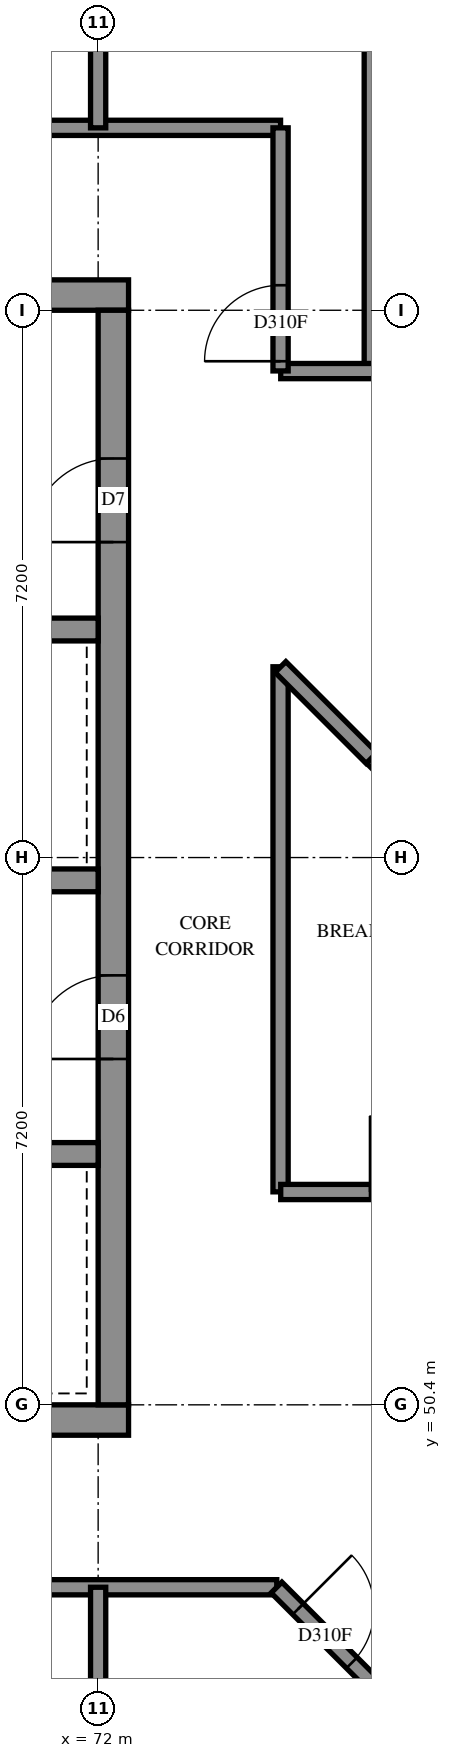
"""IFC4 building model, lengths in metres.
Left out: names, types, materials, properties, quantities, classifications, styles, units other than length and angle.
Written with IfcOpenShell. Run it as: python <this file> out.ifc"""

import sys

from ifc_helpers import new_model, si_unit, direction, frame, frame_2d, origin, place, context, subcontext, project, spatial, rectangle, extrude, element, fill, save


model = new_model("IFC4")
c1 = context("Model", 3, precision=1e-05, world=origin(), true_north=direction((0.0, 1.0)))
c2 = subcontext(c1, "Body", "Model", "MODEL_VIEW")
j1 = project(units=[si_unit("LENGTHUNIT", "METRE"), si_unit("PLANEANGLEUNIT", "RADIAN")], contexts=[c1])
p1 = place(None, origin())
s1 = spatial("IfcSite", under=j1, at=p1, CompositionType="ELEMENT")
p2 = place(p1, origin())
s2 = spatial("IfcBuilding", under=s1, at=p2, CompositionType="ELEMENT")
p3 = place(p2, frame((0.0, 0.0, 281.2)))
s3 = spatial("IfcBuildingStorey", under=s2, at=p3, CompositionType="ELEMENT", Elevation=281.2)
p4 = place(p3, frame((57.2, 50.2, -0.3), z_axis=(0.0, 0.0, 1.0), x_axis=(1.0, 0.0, 0.0)))
e1 = element("IfcWall", 1, at=p4, inside=s3, PredefinedType="SHEAR", context=c2, shape_type="SweptSolid", body=[
    extrude(rectangle(XDim=15.2, YDim=0.4, at=frame_2d((7.6, 0.0))), origin(), (0.0, 0.0, 1.0), 2.7),
])
p5 = place(p3, frame((57.2, 65.0, -0.3), z_axis=(0.0, 0.0, 1.0), x_axis=(1.0, 0.0, 0.0)))
e2 = element("IfcWall", 2, at=p5, inside=s3, PredefinedType="SHEAR", context=c2, shape_type="SweptSolid", body=[
    extrude(rectangle(XDim=15.2, YDim=0.4, at=frame_2d((7.6, 0.0))), origin(), (0.0, 0.0, 1.0), 2.7),
])
p6 = place(p5, frame((10.4, 0.0, 0.3)))
e3 = element("IfcOpeningElement", 3, at=p6, cuts=e2, PredefinedType="OPENING", context=c2, shape_type="SweptSolid", body=[
    extrude(rectangle(XDim=0.8, YDim=2.1, at=frame_2d((0.4, 1.05))), frame((0.0, 0.21, 0.0), z_axis=(0.0, -1.0, 0.0), x_axis=(1.0, 0.0, 0.0)), (0.0, 0.0, 1.0), 0.42),
])
p7 = place(p3, frame((72.2, 50.4, -0.3), z_axis=(0.0, 0.0, 1.0), x_axis=(0.0, 1.0, 0.0)))
e4 = element("IfcWall", 4, at=p7, inside=s3, PredefinedType="SHEAR", context=c2, shape_type="SweptSolid", body=[
    extrude(rectangle(XDim=14.4, YDim=0.4, at=frame_2d((7.2, 0.0))), origin(), (0.0, 0.0, 1.0), 2.7),
])
p8 = place(p7, frame((4.55, 0.0, 0.3)))
e5 = element("IfcOpeningElement", 5, at=p8, cuts=e4, PredefinedType="OPENING", context=c2, shape_type="SweptSolid", body=[
    extrude(rectangle(XDim=1.1, YDim=2.1, at=frame_2d((0.55, 1.05))), frame((0.0, 0.21, 0.0), z_axis=(0.0, -1.0, 0.0), x_axis=(1.0, 0.0, 0.0)), (0.0, 0.0, 1.0), 0.42),
])
p9 = place(p7, frame((11.35, 0.0, 0.3)))
e6 = element("IfcOpeningElement", 6, at=p9, cuts=e4, PredefinedType="OPENING", context=c2, shape_type="SweptSolid", body=[
    extrude(rectangle(XDim=1.1, YDim=2.1, at=frame_2d((0.55, 1.05))), frame((0.0, 0.21, 0.0), z_axis=(0.0, -1.0, 0.0), x_axis=(1.0, 0.0, 0.0)), (0.0, 0.0, 1.0), 0.42),
])
p10 = place(p3, frame((57.6, 53.7, 0.0), z_axis=(0.0, 0.0, 1.0), x_axis=(1.0, 0.0, 0.0)))
e7 = element("IfcWall", 7, at=p10, inside=s3, PredefinedType="SOLIDWALL", context=c2, shape_type="SweptSolid", body=[
    extrude(rectangle(XDim=14.4, YDim=0.3, at=frame_2d((7.2, 0.0))), origin(), (0.0, 0.0, 1.0), 3.1),
])
p11 = place(p10, frame((1.35, 0.0, 0.0)))
e8 = element("IfcOpeningElement", 8, at=p11, cuts=e7, PredefinedType="OPENING", context=c2, shape_type="SweptSolid", body=[
    extrude(rectangle(XDim=0.9, YDim=2.1, at=frame_2d((0.45, 1.05))), frame((0.0, 0.16, 0.0), z_axis=(0.0, -1.0, 0.0), x_axis=(1.0, 0.0, 0.0)), (0.0, 0.0, 1.0), 0.32),
])
p12 = place(p10, frame((4.95, 0.0, 0.0)))
e9 = element("IfcOpeningElement", 9, at=p12, cuts=e7, PredefinedType="OPENING", context=c2, shape_type="SweptSolid", body=[
    extrude(rectangle(XDim=0.9, YDim=2.1, at=frame_2d((0.45, 1.05))), frame((0.0, 0.16, 0.0), z_axis=(0.0, -1.0, 0.0), x_axis=(1.0, 0.0, 0.0)), (0.0, 0.0, 1.0), 0.32),
])
p13 = place(p10, frame((8.55, 0.0, 0.0)))
e10 = element("IfcOpeningElement", 10, at=p13, cuts=e7, PredefinedType="OPENING", context=c2, shape_type="SweptSolid", body=[
    extrude(rectangle(XDim=0.9, YDim=2.1, at=frame_2d((0.45, 1.05))), frame((0.0, 0.16, 0.0), z_axis=(0.0, -1.0, 0.0), x_axis=(1.0, 0.0, 0.0)), (0.0, 0.0, 1.0), 0.32),
])
p14 = place(p10, frame((12.05, 0.0, 0.0)))
e11 = element("IfcOpeningElement", 11, at=p14, cuts=e7, PredefinedType="OPENING", context=c2, shape_type="SweptSolid", body=[
    extrude(rectangle(XDim=1.1, YDim=2.1, at=frame_2d((0.55, 1.05))), frame((0.0, 0.16, 0.0), z_axis=(0.0, -1.0, 0.0), x_axis=(1.0, 0.0, 0.0)), (0.0, 0.0, 1.0), 0.32),
])
p15 = place(p3, frame((57.6, 57.3, 0.0), z_axis=(0.0, 0.0, 1.0), x_axis=(1.0, 0.0, 0.0)))
e12 = element("IfcWall", 12, at=p15, inside=s3, PredefinedType="SOLIDWALL", context=c2, shape_type="SweptSolid", body=[
    extrude(rectangle(XDim=14.4, YDim=0.3, at=frame_2d((7.2, 0.0))), origin(), (0.0, 0.0, 1.0), 3.1),
])
p16 = place(p15, frame((8.55, 0.0, 0.0)))
e13 = element("IfcOpeningElement", 13, at=p16, cuts=e12, PredefinedType="OPENING", context=c2, shape_type="SweptSolid", body=[
    extrude(rectangle(XDim=0.9, YDim=2.1, at=frame_2d((0.45, 1.05))), frame((0.0, 0.16, 0.0), z_axis=(0.0, -1.0, 0.0), x_axis=(1.0, 0.0, 0.0)), (0.0, 0.0, 1.0), 0.32),
])
p17 = place(p15, frame((1.25, 0.0, 0.0)))
e14 = element("IfcOpeningElement", 14, at=p17, cuts=e12, PredefinedType="OPENING", context=c2, shape_type="SweptSolid", body=[
    extrude(rectangle(XDim=1.1, YDim=2.1, at=frame_2d((0.55, 1.05))), frame((0.0, 0.16, 0.0), z_axis=(0.0, -1.0, 0.0), x_axis=(1.0, 0.0, 0.0)), (0.0, 0.0, 1.0), 0.32),
])
p18 = place(p15, frame((4.85, 0.0, 0.0)))
e15 = element("IfcOpeningElement", 15, at=p18, cuts=e12, PredefinedType="OPENING", context=c2, shape_type="SweptSolid", body=[
    extrude(rectangle(XDim=1.1, YDim=2.1, at=frame_2d((0.55, 1.05))), frame((0.0, 0.16, 0.0), z_axis=(0.0, -1.0, 0.0), x_axis=(1.0, 0.0, 0.0)), (0.0, 0.0, 1.0), 0.32),
])
p19 = place(p15, frame((12.05, 0.0, 0.0)))
e16 = element("IfcOpeningElement", 16, at=p19, cuts=e12, PredefinedType="OPENING", context=c2, shape_type="SweptSolid", body=[
    extrude(rectangle(XDim=1.1, YDim=2.1, at=frame_2d((0.55, 1.05))), frame((0.0, 0.16, 0.0), z_axis=(0.0, -1.0, 0.0), x_axis=(1.0, 0.0, 0.0)), (0.0, 0.0, 1.0), 0.32),
])
p20 = place(p3, frame((64.8, 60.6, 0.0), z_axis=(0.0, 0.0, 1.0), x_axis=(1.0, 0.0, 0.0)))
e17 = element("IfcWall", 17, at=p20, inside=s3, PredefinedType="SOLIDWALL", context=c2, shape_type="SweptSolid", body=[
    extrude(rectangle(XDim=7.2, YDim=0.3, at=frame_2d((3.6, 0.0))), origin(), (0.0, 0.0, 1.0), 3.1),
])
p21 = place(p3, frame((55.2, 67.2, 0.0), z_axis=(0.0, 0.0, 1.0), x_axis=(1.0, 0.0, 0.0)))
e18 = element("IfcWall", 18, at=p21, inside=s3, PredefinedType="PARTITIONING", context=c2, shape_type="SweptSolid", body=[
    extrude(rectangle(XDim=19.2, YDim=0.2, at=frame_2d((9.6, 0.0))), origin(), (0.0, 0.0, 1.0), 3.1),
])
p22 = place(p21, frame((6.299, 0.0, 0.0)))
e19 = element("IfcOpeningElement", 19, at=p22, cuts=e18, PredefinedType="OPENING", context=c2, shape_type="SweptSolid", body=[
    extrude(rectangle(XDim=0.9, YDim=2.1, at=frame_2d((0.45, 1.05))), frame((0.0, 0.11, 0.0), z_axis=(0.0, -1.0, 0.0), x_axis=(1.0, 0.0, 0.0)), (0.0, 0.0, 1.0), 0.22),
])
p23 = place(p21, frame((13.65, 0.0, 0.0)))
e20 = element("IfcOpeningElement", 20, at=p23, cuts=e18, PredefinedType="OPENING", context=c2, shape_type="SweptSolid", body=[
    extrude(rectangle(XDim=0.9, YDim=2.1, at=frame_2d((0.45, 1.05))), frame((0.0, 0.11, 0.0), z_axis=(0.0, -1.0, 0.0), x_axis=(1.0, 0.0, 0.0)), (0.0, 0.0, 1.0), 0.22),
])
p24 = place(p3, frame((55.2, 48.0, 0.0), z_axis=(0.0, 0.0, 1.0), x_axis=(1.0, 0.0, 0.0)))
e21 = element("IfcWall", 21, at=p24, inside=s3, PredefinedType="PARTITIONING", context=c2, shape_type="SweptSolid", body=[
    extrude(rectangle(XDim=19.15, YDim=0.2, at=frame_2d((9.575, 0.0))), origin(), (0.0, 0.0, 1.0), 3.1),
])
p25 = place(p24, frame((6.243, 0.0, 0.0)))
e22 = element("IfcOpeningElement", 22, at=p25, cuts=e21, PredefinedType="OPENING", context=c2, shape_type="SweptSolid", body=[
    extrude(rectangle(XDim=0.9, YDim=2.1, at=frame_2d((0.45, 1.05))), frame((0.0, 0.11, 0.0), z_axis=(0.0, -1.0, 0.0), x_axis=(1.0, 0.0, 0.0)), (0.0, 0.0, 1.0), 0.22),
])
p26 = place(p24, frame((11.675, 0.0, 0.0)))
e23 = element("IfcOpeningElement", 23, at=p26, cuts=e21, PredefinedType="OPENING", context=c2, shape_type="SweptSolid", body=[
    extrude(rectangle(XDim=1.0, YDim=2.1, at=frame_2d((0.5, 1.05))), frame((0.0, 0.11, 0.0), z_axis=(0.0, -1.0, 0.0), x_axis=(1.0, 0.0, 0.0)), (0.0, 0.0, 1.0), 0.22),
])
p27 = place(p24, frame((13.707, 0.0, 0.0)))
e24 = element("IfcOpeningElement", 24, at=p27, cuts=e21, PredefinedType="OPENING", context=c2, shape_type="SweptSolid", body=[
    extrude(rectangle(XDim=1.0, YDim=2.1, at=frame_2d((0.5, 1.05))), frame((0.0, 0.11, 0.0), z_axis=(0.0, -1.0, 0.0), x_axis=(1.0, 0.0, 0.0)), (0.0, 0.0, 1.0), 0.22),
])
p28 = place(p3, frame((75.6, 64.0, 0.0), z_axis=(0.0, 0.0, 1.0), x_axis=(0.0, 1.0, 0.0)))
e25 = element("IfcWall", 25, at=p28, inside=s3, PredefinedType="PARTITIONING", context=c2, shape_type="SweptSolid", body=[
    extrude(rectangle(XDim=8.75, YDim=0.2, at=frame_2d((4.375, 0.0))), origin(), (0.0, 0.0, 1.0), 3.1),
])
p29 = place(p3, frame((74.4, 53.202, 0.0), z_axis=(0.0, 0.0, 1.0), x_axis=(0.0, 1.0, 0.0)))
e26 = element("IfcWall", 26, at=p29, inside=s3, PredefinedType="PARTITIONING", context=c2, shape_type="SweptSolid", body=[
    extrude(rectangle(XDim=6.908, YDim=0.2, at=frame_2d((3.454, 0.0))), origin(), (0.0, 0.0, 1.0), 3.1),
])
p30 = place(p3, frame((74.402, 64.0, 0.0), z_axis=(0.0, 0.0, 1.0), x_axis=(1.0, 0.0, 0.0)))
e27 = element("IfcWall", 27, at=p30, inside=s3, PredefinedType="PARTITIONING", context=c2, shape_type="SweptSolid", body=[
    extrude(rectangle(XDim=4.798, YDim=0.2, at=frame_2d((2.399, 0.0))), origin(), (0.0, 0.0, 1.0), 3.1),
])
p31 = place(p30, frame((1.723, 0.0, 0.0)))
e28 = element("IfcOpeningElement", 28, at=p31, cuts=e27, PredefinedType="OPENING", context=c2, shape_type="SweptSolid", body=[
    extrude(rectangle(XDim=1.0, YDim=2.1, at=frame_2d((0.5, 1.05))), frame((0.0, 0.11, 0.0), z_axis=(0.0, -1.0, 0.0), x_axis=(1.0, 0.0, 0.0)), (0.0, 0.0, 1.0), 0.22),
])
p32 = place(p3, frame((74.347, 47.997, 0.0), z_axis=(0.0, 0.0, 1.0), x_axis=(0.7071067812, -0.7071067812, 0.0)))
e29 = element("IfcWall", 29, at=p32, inside=s3, PredefinedType="PARTITIONING", context=c2, shape_type="SweptSolid", body=[
    extrude(rectangle(XDim=4.596, YDim=0.2, at=frame_2d((2.298, 0.0))), origin(), (0.0, 0.0, 1.0), 3.1),
])
p33 = place(p32, frame((0.401, 0.0, 0.0)))
e30 = element("IfcOpeningElement", 30, at=p33, cuts=e29, PredefinedType="OPENING", context=c2, shape_type="SweptSolid", body=[
    extrude(rectangle(XDim=1.0, YDim=2.1, at=frame_2d((0.5, 1.05))), frame((0.0, 0.11, 0.0), z_axis=(0.0, -1.0, 0.0), x_axis=(1.0, 0.0, 0.0)), (0.0, 0.0, 1.0), 0.22),
])
p34 = place(p3, frame((72.0, 43.55, 0.0), z_axis=(0.0, 0.0, 1.0), x_axis=(0.0, 1.0, 0.0)))
e31 = element("IfcWall", 31, at=p34, inside=s3, PredefinedType="PARTITIONING", context=c2, shape_type="SweptSolid", body=[
    extrude(rectangle(XDim=4.45, YDim=0.2, at=frame_2d((2.225, 0.0))), origin(), (0.0, 0.0, 1.0), 3.1),
])
p35 = place(p3, frame((72.0, 67.2, 0.0), z_axis=(0.0, 0.0, 1.0), x_axis=(0.0, 1.0, 0.0)))
e32 = element("IfcWall", 32, at=p35, inside=s3, PredefinedType="PARTITIONING", context=c2, shape_type="SweptSolid", body=[
    extrude(rectangle(XDim=4.346, YDim=0.2, at=frame_2d((2.173, 0.0))), origin(), (0.0, 0.0, 1.0), 3.1),
])
p36 = place(p3, frame((74.4, 64.002, 0.0), z_axis=(0.0, 0.0, 1.0), x_axis=(0.0, 1.0, 0.0)))
e33 = element("IfcWall", 33, at=p36, inside=s3, PredefinedType="PARTITIONING", context=c2, shape_type="SweptSolid", body=[
    extrude(rectangle(XDim=3.198, YDim=0.2, at=frame_2d((1.599, 0.0))), origin(), (0.0, 0.0, 1.0), 3.1),
])
p37 = place(p36, frame((0.127, 0.0, 0.0)))
e34 = element("IfcOpeningElement", 34, at=p37, cuts=e33, PredefinedType="OPENING", context=c2, shape_type="SweptSolid", body=[
    extrude(rectangle(XDim=1.0, YDim=2.1, at=frame_2d((0.5, 1.05))), frame((0.0, 0.11, 0.0), z_axis=(0.0, -1.0, 0.0), x_axis=(1.0, 0.0, 0.0)), (0.0, 0.0, 1.0), 0.22),
])
p38 = place(p3, frame((74.402, 53.2, 0.0), z_axis=(0.0, 0.0, 1.0), x_axis=(1.0, 0.0, 0.0)))
e35 = element("IfcWall", 35, at=p38, inside=s3, PredefinedType="PARTITIONING", context=c2, shape_type="SweptSolid", body=[
    extrude(rectangle(XDim=2.968, YDim=0.2, at=frame_2d((1.484, 0.0))), origin(), (0.0, 0.0, 1.0), 3.1),
])
p39 = place(p38, frame((1.175, 0.0, 0.0)))
e36 = element("IfcOpeningElement", 36, at=p39, cuts=e35, PredefinedType="OPENING", context=c2, shape_type="SweptSolid", body=[
    extrude(rectangle(XDim=1.0, YDim=2.1, at=frame_2d((0.5, 1.05))), frame((0.0, 0.11, 0.0), z_axis=(0.0, -1.0, 0.0), x_axis=(1.0, 0.0, 0.0)), (0.0, 0.0, 1.0), 0.22),
])
p40 = place(p3, frame((75.601, 58.913, 0.0), z_axis=(0.0, 0.0, 1.0), x_axis=(0.707460777, -0.7067526081, 0.0)))
e37 = element("IfcWall", 37, at=p40, inside=s3, PredefinedType="PARTITIONING", context=c2, shape_type="SweptSolid", body=[
    extrude(rectangle(XDim=2.824, YDim=0.2, at=frame_2d((1.412, 0.0))), origin(), (0.0, 0.0, 1.0), 3.1),
])
p41 = place(p3, frame((74.399, 60.107, 0.0), z_axis=(0.0, 0.0, 1.0), x_axis=(0.7071067812, -0.7071067812, 0.0)))
e38 = element("IfcWall", 38, at=p41, inside=s3, PredefinedType="PARTITIONING", context=c2, shape_type="SweptSolid", body=[
    extrude(rectangle(XDim=1.694, YDim=0.2, at=frame_2d((0.847, 0.0))), origin(), (0.0, 0.0, 1.0), 3.1),
])
p42 = place(p8, origin())
e39 = element("IfcDoor", 39, at=p42, inside=s3, OperationType="DOUBLE_DOOR_SINGLE_SWING", PredefinedType="DOOR", context=c2, shape_type="SweptSolid", body=[
    extrude(rectangle(XDim=1.1, YDim=2.1, at=frame_2d((0.55, 1.05))), frame((0.0, 0.025, 0.0), z_axis=(0.0, -1.0, 0.0), x_axis=(1.0, 0.0, 0.0)), (0.0, 0.0, 1.0), 0.05),
])
fill(e5, e39)
p43 = place(p9, origin())
e40 = element("IfcDoor", 40, at=p43, inside=s3, OperationType="SINGLE_SWING_RIGHT", PredefinedType="DOOR", context=c2, shape_type="SweptSolid", body=[
    extrude(rectangle(XDim=1.1, YDim=2.1, at=frame_2d((0.55, 1.05))), frame((0.0, 0.025, 0.0), z_axis=(0.0, -1.0, 0.0), x_axis=(1.0, 0.0, 0.0)), (0.0, 0.0, 1.0), 0.05),
])
fill(e6, e40)
p44 = place(p39, origin())
e41 = element("IfcDoor", 41, at=p44, inside=s3, OperationType="SINGLE_SWING_LEFT", PredefinedType="DOOR", context=c2, shape_type="SweptSolid", body=[
    extrude(rectangle(XDim=1.0, YDim=2.1, at=frame_2d((0.5, 1.05))), frame((0.0, 0.025, 0.0), z_axis=(0.0, -1.0, 0.0), x_axis=(1.0, 0.0, 0.0)), (0.0, 0.0, 1.0), 0.05),
])
fill(e36, e41)
p45 = place(p37, origin())
e42 = element("IfcDoor", 42, at=p45, inside=s3, OperationType="SINGLE_SWING_RIGHT", PredefinedType="DOOR", context=c2, shape_type="SweptSolid", body=[
    extrude(rectangle(XDim=1.0, YDim=2.1, at=frame_2d((0.5, 1.05))), frame((0.0, 0.025, 0.0), z_axis=(0.0, -1.0, 0.0), x_axis=(1.0, 0.0, 0.0)), (0.0, 0.0, 1.0), 0.05),
])
fill(e34, e42)
p46 = place(p33, origin())
e43 = element("IfcDoor", 43, at=p46, inside=s3, OperationType="SINGLE_SWING_LEFT", PredefinedType="DOOR", context=c2, shape_type="SweptSolid", body=[
    extrude(rectangle(XDim=1.0, YDim=2.1, at=frame_2d((0.5, 1.05))), frame((0.0, 0.025, 0.0), z_axis=(0.0, -1.0, 0.0), x_axis=(1.0, 0.0, 0.0)), (0.0, 0.0, 1.0), 0.05),
])
fill(e30, e43)
save(model, sys.argv[1])
